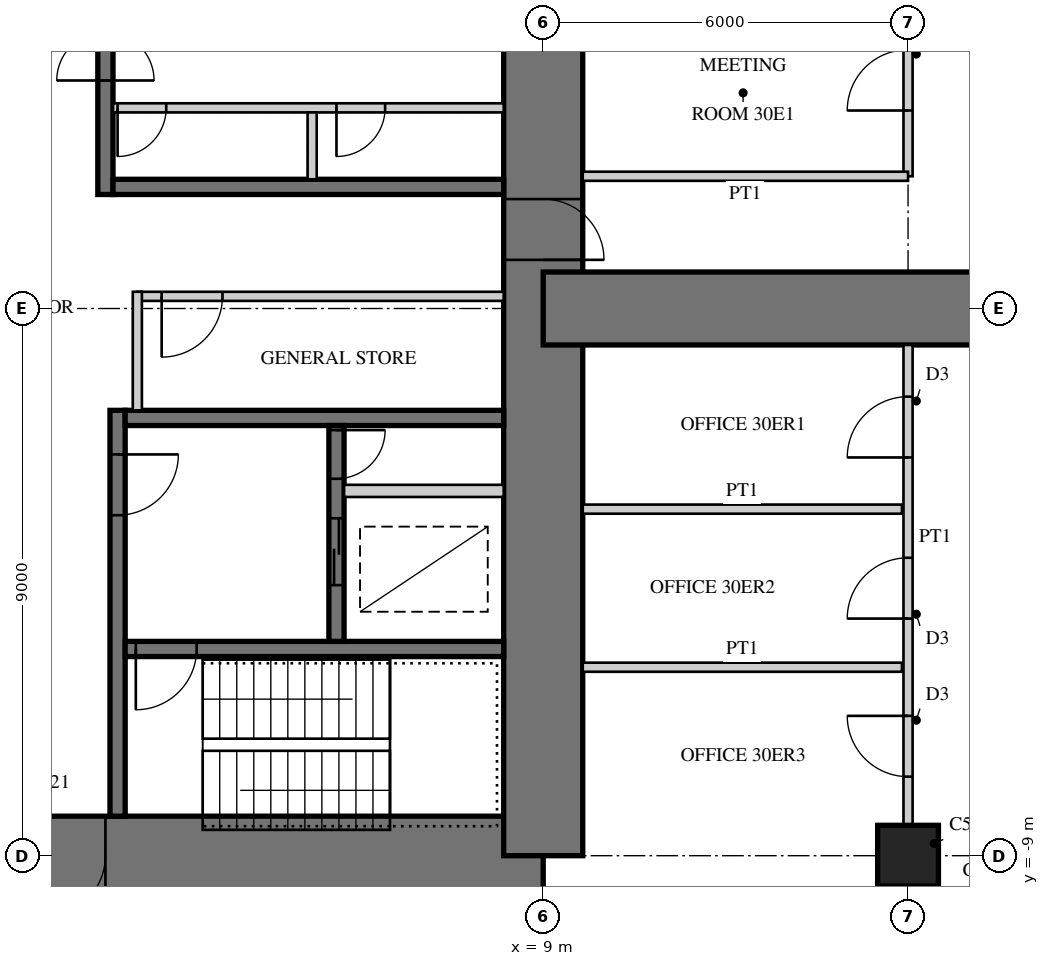
"""IFC4 building model, lengths in metres.
Left out: names, types, materials, properties, quantities, classifications, styles, units other than length and angle.
Written with IfcOpenShell. Run it as: python <this file> out.ifc"""

import sys

from ifc_helpers import new_model, si_unit, direction, frame, frame_2d, origin, origin_2d, place, context, subcontext, project, spatial, rectangle, extrude, element, fill, save


model = new_model("IFC4")
c1 = context("Model", 3, precision=1e-05, world=origin(), true_north=direction((0.0, 1.0)))
c2 = subcontext(c1, "Body", "Model", "MODEL_VIEW")
j1 = project(units=[si_unit("LENGTHUNIT", "METRE"), si_unit("PLANEANGLEUNIT", "RADIAN")], contexts=[c1])
p1 = place(None, origin())
s1 = spatial("IfcSite", under=j1, at=p1, CompositionType="ELEMENT")
p2 = place(p1, origin())
s2 = spatial("IfcBuilding", under=s1, at=p2, CompositionType="ELEMENT")
p3 = place(p2, frame((0.0, 0.0, 124.5)))
s3 = spatial("IfcBuildingStorey", under=s2, at=p3, CompositionType="ELEMENT", Elevation=124.5)
p4 = place(p3, frame((-9.0, -9.0, 0.0), z_axis=(0.0, 0.0, 1.0), x_axis=(1.0, 0.0, 0.0)))
e1 = element("IfcWall", 1, at=p4, inside=s3, PredefinedType="SHEAR", context=c2, shape_type="SweptSolid", body=[
    extrude(rectangle(XDim=18.0, YDim=1.3, at=frame_2d((9.0, 0.0))), origin(), (0.0, 0.0, 1.0), 4.0),
])
p5 = place(p4, frame((9.8, 0.0, 0.0)))
e2 = element("IfcOpeningElement", 2, at=p5, cuts=e1, PredefinedType="OPENING", context=c2, shape_type="SweptSolid", body=[
    extrude(rectangle(XDim=1.0, YDim=2.4, at=frame_2d((0.5, 1.2))), frame((0.0, 0.66, 0.0), z_axis=(0.0, -1.0, 0.0), x_axis=(1.0, 0.0, 0.0)), (0.0, 0.0, 1.0), 1.32),
])
p6 = place(p3, frame((9.0, -9.0, 0.0), z_axis=(0.0, 0.0, 1.0), x_axis=(0.0, 1.0, 0.0)))
e3 = element("IfcWall", 3, at=p6, inside=s3, PredefinedType="SHEAR", context=c2, shape_type="SweptSolid", body=[
    extrude(rectangle(XDim=18.0, YDim=1.3, at=frame_2d((9.0, 0.0))), origin(), (0.0, 0.0, 1.0), 4.0),
])
p7 = place(p6, frame((9.8, 0.0, 0.0)))
e4 = element("IfcOpeningElement", 4, at=p7, cuts=e3, PredefinedType="OPENING", context=c2, shape_type="SweptSolid", body=[
    extrude(rectangle(XDim=1.0, YDim=2.4, at=frame_2d((0.5, 1.2))), frame((0.0, 0.66, 0.0), z_axis=(0.0, -1.0, 0.0), x_axis=(1.0, 0.0, 0.0)), (0.0, 0.0, 1.0), 1.32),
])
p8 = place(p3, frame((1.8, 1.875, 0.0), z_axis=(0.0, 0.0, 1.0), x_axis=(0.0, 1.0, 0.0)))
e5 = element("IfcWall", 5, at=p8, inside=s3, PredefinedType="SHEAR", context=c2, shape_type="SweptSolid", body=[
    extrude(rectangle(XDim=6.475, YDim=0.25, at=frame_2d((3.238, 0.0))), origin(), (0.0, 0.0, 1.0), 4.0),
])
p9 = place(p8, frame((1.875, 0.0, 0.0)))
e6 = element("IfcOpeningElement", 6, at=p9, cuts=e5, PredefinedType="OPENING", context=c2, shape_type="SweptSolid", body=[
    extrude(rectangle(XDim=1.6, YDim=2.4, at=frame_2d((0.8, 1.2))), frame((0.0, 0.135, 0.0), z_axis=(0.0, -1.0, 0.0), x_axis=(1.0, 0.0, 0.0)), (0.0, 0.0, 1.0), 0.27),
])
p10 = place(p3, frame((1.925, 2.0, 0.0), z_axis=(0.0, 0.0, 1.0), x_axis=(1.0, 0.0, 0.0)))
e7 = element("IfcWall", 7, at=p10, inside=s3, PredefinedType="SHEAR", context=c2, shape_type="SweptSolid", body=[
    extrude(rectangle(XDim=6.425, YDim=0.25, at=frame_2d((3.212, 0.0))), origin(), (0.0, 0.0, 1.0), 4.0),
])
p11 = place(p3, frame((1.925, 3.3, 0.0), z_axis=(0.0, 0.0, 1.0), x_axis=(1.0, 0.0, 0.0)))
e8 = element("IfcWall", 8, at=p11, inside=s3, PredefinedType="PARTITIONING", context=c2, shape_type="SweptSolid", body=[
    extrude(rectangle(XDim=6.425, YDim=0.15, at=frame_2d((3.212, 0.0))), origin(), (0.0, 0.0, 1.0), 4.0),
])
p12 = place(p11, frame((0.075, 0.0, 0.0)))
e9 = element("IfcOpeningElement", 9, at=p12, cuts=e8, PredefinedType="OPENING", context=c2, shape_type="SweptSolid", body=[
    extrude(rectangle(XDim=0.8, YDim=2.1, at=frame_2d((0.4, 1.05))), frame((0.0, 0.085, 0.0), z_axis=(0.0, -1.0, 0.0), x_axis=(1.0, 0.0, 0.0)), (0.0, 0.0, 1.0), 0.17),
])
p13 = place(p11, frame((3.675, 0.0, 0.0)))
e10 = element("IfcOpeningElement", 10, at=p13, cuts=e8, PredefinedType="OPENING", context=c2, shape_type="SweptSolid", body=[
    extrude(rectangle(XDim=0.8, YDim=2.1, at=frame_2d((0.4, 1.05))), frame((0.0, 0.085, 0.0), z_axis=(0.0, -1.0, 0.0), x_axis=(1.0, 0.0, 0.0)), (0.0, 0.0, 1.0), 0.17),
])
p14 = place(p3, frame((5.2, 2.125, 0.0), z_axis=(0.0, 0.0, 1.0), x_axis=(0.0, 1.0, 0.0)))
e11 = element("IfcWall", 11, at=p14, inside=s3, PredefinedType="PARTITIONING", context=c2, shape_type="SweptSolid", body=[
    extrude(rectangle(XDim=1.1, YDim=0.15, at=frame_2d((0.55, 0.0))), origin(), (0.0, 0.0, 1.0), 4.0),
])
p15 = place(p3, frame((2.0, -1.675, 0.0), z_axis=(0.0, 0.0, 1.0), x_axis=(0.0, -1.0, 0.0)))
e12 = element("IfcWall", 12, at=p15, inside=s3, PredefinedType="SHEAR", context=c2, shape_type="SweptSolid", body=[
    extrude(rectangle(XDim=6.675, YDim=0.25, at=frame_2d((3.337, 0.0))), origin(), (0.0, 0.0, 1.0), 4.0),
])
p16 = place(p15, frame((0.725, 0.0, 0.0)))
e13 = element("IfcOpeningElement", 13, at=p16, cuts=e12, PredefinedType="OPENING", context=c2, shape_type="SweptSolid", body=[
    extrude(rectangle(XDim=1.0, YDim=2.1, at=frame_2d((0.5, 1.05))), frame((0.0, 0.135, 0.0), z_axis=(0.0, -1.0, 0.0), x_axis=(1.0, 0.0, 0.0)), (0.0, 0.0, 1.0), 0.27),
])
p17 = place(p3, frame((2.125, -1.8, 0.0), z_axis=(0.0, 0.0, 1.0), x_axis=(1.0, 0.0, 0.0)))
e14 = element("IfcWall", 14, at=p17, inside=s3, PredefinedType="SHEAR", context=c2, shape_type="SweptSolid", body=[
    extrude(rectangle(XDim=6.225, YDim=0.25, at=frame_2d((3.113, 0.0))), origin(), (0.0, 0.0, 1.0), 4.0),
])
p18 = place(p3, frame((2.125, -5.6, 0.0), z_axis=(0.0, 0.0, 1.0), x_axis=(1.0, 0.0, 0.0)))
e15 = element("IfcWall", 15, at=p18, inside=s3, PredefinedType="SHEAR", context=c2, shape_type="SweptSolid", body=[
    extrude(rectangle(XDim=6.225, YDim=0.25, at=frame_2d((3.113, 0.0))), origin(), (0.0, 0.0, 1.0), 4.0),
])
p19 = place(p18, frame((0.175, 0.0, 0.0)))
e16 = element("IfcOpeningElement", 16, at=p19, cuts=e15, PredefinedType="OPENING", context=c2, shape_type="SweptSolid", body=[
    extrude(rectangle(XDim=1.0, YDim=2.1, at=frame_2d((0.5, 1.05))), frame((0.0, 0.135, 0.0), z_axis=(0.0, -1.0, 0.0), x_axis=(1.0, 0.0, 0.0)), (0.0, 0.0, 1.0), 0.27),
])
p20 = place(p3, frame((5.6, -1.925, 0.0), z_axis=(0.0, 0.0, 1.0), x_axis=(0.0, -1.0, 0.0)))
e17 = element("IfcWall", 17, at=p20, inside=s3, PredefinedType="SHEAR", context=c2, shape_type="SweptSolid", body=[
    extrude(rectangle(XDim=3.55, YDim=0.25, at=frame_2d((1.775, 0.0))), origin(), (0.0, 0.0, 1.0), 4.0),
])
p21 = place(p20, frame((1.525, 0.0, 0.0)))
e18 = element("IfcOpeningElement", 18, at=p21, cuts=e17, PredefinedType="OPENING", context=c2, shape_type="SweptSolid", body=[
    extrude(rectangle(XDim=1.1, YDim=2.2, at=frame_2d((0.55, 1.1))), frame((0.0, 0.135, 0.0), z_axis=(0.0, -1.0, 0.0), x_axis=(1.0, 0.0, 0.0)), (0.0, 0.0, 1.0), 0.27),
])
p22 = place(p20, frame((0.075, 0.0, 0.0)))
e19 = element("IfcOpeningElement", 19, at=p22, cuts=e17, PredefinedType="OPENING", context=c2, shape_type="SweptSolid", body=[
    extrude(rectangle(XDim=0.8, YDim=2.1, at=frame_2d((0.4, 1.05))), frame((0.0, 0.135, 0.0), z_axis=(0.0, -1.0, 0.0), x_axis=(1.0, 0.0, 0.0)), (0.0, 0.0, 1.0), 0.27),
])
p23 = place(p3, frame((5.725, -3.0, 0.0), z_axis=(0.0, 0.0, 1.0), x_axis=(1.0, 0.0, 0.0)))
e20 = element("IfcWall", 20, at=p23, inside=s3, PredefinedType="PARTITIONING", context=c2, shape_type="SweptSolid", body=[
    extrude(rectangle(XDim=2.625, YDim=0.2, at=frame_2d((1.312, 0.0))), origin(), (0.0, 0.0, 1.0), 4.0),
])
p24 = place(p3, frame((9.0, 0.0, 0.0), z_axis=(0.0, 0.0, 1.0), x_axis=(1.0, 0.0, 0.0)))
e21 = element("IfcWall", 21, at=p24, inside=s3, PredefinedType="SHEAR", context=c2, shape_type="SweptSolid", body=[
    extrude(rectangle(XDim=18.0, YDim=1.2, at=frame_2d((9.0, 0.0))), origin(), (0.0, 0.0, 1.0), 4.0),
])
p25 = place(p24, frame((9.8, 0.0, 0.0)))
e22 = element("IfcOpeningElement", 22, at=p25, cuts=e21, PredefinedType="OPENING", context=c2, shape_type="SweptSolid", body=[
    extrude(rectangle(XDim=1.0, YDim=2.2, at=frame_2d((0.5, 1.1))), frame((0.0, 0.61, 0.0), z_axis=(0.0, -1.0, 0.0), x_axis=(1.0, 0.0, 0.0)), (0.0, 0.0, 1.0), 1.22),
])
p26 = place(p3, frame((15.0, -9.0, 0.0), z_axis=(0.0, 0.0, 1.0), x_axis=(1.0, 0.0, 0.0)))
e23 = element("IfcColumn", 23, at=p26, inside=s3, PredefinedType="COLUMN", context=c2, shape_type="SweptSolid", body=[
    extrude(rectangle(XDim=1.0, YDim=1.0, at=origin_2d()), origin(), (0.0, 0.0, 1.0), 4.0),
])
p27 = place(p3, frame((2.325, 0.2, 0.0), z_axis=(0.0, 0.0, 1.0), x_axis=(1.0, 0.0, 0.0)))
e24 = element("IfcWall", 24, at=p27, inside=s3, PredefinedType="PARTITIONING", context=c2, shape_type="SweptSolid", body=[
    extrude(rectangle(XDim=6.025, YDim=0.15, at=frame_2d((3.013, 0.0))), origin(), (0.0, 0.0, 1.0), 3.8),
])
p28 = place(p27, frame((0.4, 0.0, 0.0)))
e25 = element("IfcOpeningElement", 25, at=p28, cuts=e24, PredefinedType="OPENING", context=c2, shape_type="SweptSolid", body=[
    extrude(rectangle(XDim=1.0, YDim=2.1, at=frame_2d((0.5, 1.05))), frame((0.0, 0.085, 0.0), z_axis=(0.0, -1.0, 0.0), x_axis=(1.0, 0.0, 0.0)), (0.0, 0.0, 1.0), 0.17),
])
p29 = place(p3, frame((2.325, -1.675, 0.0), z_axis=(0.0, 0.0, 1.0), x_axis=(0.0, 1.0, 0.0)))
e26 = element("IfcWall", 26, at=p29, inside=s3, PredefinedType="PARTITIONING", context=c2, shape_type="SweptSolid", body=[
    extrude(rectangle(XDim=1.95, YDim=0.15, at=frame_2d((0.975, 0.0))), origin(), (0.0, 0.0, 1.0), 3.8),
])
p30 = place(p3, frame((15.0, 2.175, 0.0), z_axis=(0.0, 0.0, 1.0), x_axis=(0.0, 1.0, 0.0)))
e27 = element("IfcWall", 27, at=p30, inside=s3, PredefinedType="PARTITIONING", context=c2, shape_type="SweptSolid", body=[
    extrude(rectangle(XDim=6.325, YDim=0.15, at=frame_2d((3.163, 0.0))), origin(), (0.0, 0.0, 1.0), 3.0),
])
p31 = place(p30, frame((1.081, 0.0, 0.0)))
e28 = element("IfcOpeningElement", 28, at=p31, cuts=e27, PredefinedType="OPENING", context=c2, shape_type="SweptSolid", body=[
    extrude(rectangle(XDim=1.0, YDim=2.1, at=frame_2d((0.5, 1.05))), frame((0.0, 0.085, 0.0), z_axis=(0.0, -1.0, 0.0), x_axis=(1.0, 0.0, 0.0)), (0.0, 0.0, 1.0), 0.17),
])
p32 = place(p30, frame((4.244, 0.0, 0.0)))
e29 = element("IfcOpeningElement", 29, at=p32, cuts=e27, PredefinedType="OPENING", context=c2, shape_type="SweptSolid", body=[
    extrude(rectangle(XDim=1.0, YDim=2.1, at=frame_2d((0.5, 1.05))), frame((0.0, 0.085, 0.0), z_axis=(0.0, -1.0, 0.0), x_axis=(1.0, 0.0, 0.0)), (0.0, 0.0, 1.0), 0.17),
])
p33 = place(p3, frame((9.65, 2.175, 0.0), z_axis=(0.0, 0.0, 1.0), x_axis=(1.0, 0.0, 0.0)))
e30 = element("IfcWall", 30, at=p33, inside=s3, PredefinedType="PARTITIONING", context=c2, shape_type="SweptSolid", body=[
    extrude(rectangle(XDim=5.35, YDim=0.15, at=frame_2d((2.675, 0.0))), origin(), (0.0, 0.0, 1.0), 3.8),
])
p34 = place(p3, frame((15.0, -8.5, 0.0), z_axis=(0.0, 0.0, 1.0), x_axis=(0.0, 1.0, 0.0)))
e31 = element("IfcWall", 31, at=p34, inside=s3, PredefinedType="PARTITIONING", context=c2, shape_type="SweptSolid", body=[
    extrude(rectangle(XDim=7.9, YDim=0.15, at=frame_2d((3.95, 0.0))), origin(), (0.0, 0.0, 1.0), 3.0),
])
p35 = place(p34, frame((0.8, 0.0, 0.0)))
e32 = element("IfcOpeningElement", 32, at=p35, cuts=e31, PredefinedType="OPENING", context=c2, shape_type="SweptSolid", body=[
    extrude(rectangle(XDim=1.0, YDim=2.1, at=frame_2d((0.5, 1.05))), frame((0.0, 0.085, 0.0), z_axis=(0.0, -1.0, 0.0), x_axis=(1.0, 0.0, 0.0)), (0.0, 0.0, 1.0), 0.17),
])
p36 = place(p34, frame((3.4, 0.0, 0.0)))
e33 = element("IfcOpeningElement", 33, at=p36, cuts=e31, PredefinedType="OPENING", context=c2, shape_type="SweptSolid", body=[
    extrude(rectangle(XDim=1.0, YDim=2.1, at=frame_2d((0.5, 1.05))), frame((0.0, 0.085, 0.0), z_axis=(0.0, -1.0, 0.0), x_axis=(1.0, 0.0, 0.0)), (0.0, 0.0, 1.0), 0.17),
])
p37 = place(p34, frame((6.05, 0.0, 0.0)))
e34 = element("IfcOpeningElement", 34, at=p37, cuts=e31, PredefinedType="OPENING", context=c2, shape_type="SweptSolid", body=[
    extrude(rectangle(XDim=1.0, YDim=2.1, at=frame_2d((0.5, 1.05))), frame((0.0, 0.085, 0.0), z_axis=(0.0, -1.0, 0.0), x_axis=(1.0, 0.0, 0.0)), (0.0, 0.0, 1.0), 0.17),
])
p38 = place(p3, frame((9.65, -3.3, 0.0), z_axis=(0.0, 0.0, 1.0), x_axis=(1.0, 0.0, 0.0)))
e35 = element("IfcWall", 35, at=p38, inside=s3, PredefinedType="PARTITIONING", context=c2, shape_type="SweptSolid", body=[
    extrude(rectangle(XDim=5.25, YDim=0.15, at=frame_2d((2.625, 0.0))), origin(), (0.0, 0.0, 1.0), 3.8),
])
p39 = place(p3, frame((9.65, -5.9, 0.0), z_axis=(0.0, 0.0, 1.0), x_axis=(1.0, 0.0, 0.0)))
e36 = element("IfcWall", 36, at=p39, inside=s3, PredefinedType="PARTITIONING", context=c2, shape_type="SweptSolid", body=[
    extrude(rectangle(XDim=5.25, YDim=0.15, at=frame_2d((2.625, 0.0))), origin(), (0.0, 0.0, 1.0), 3.1),
])
p40 = place(p28, frame((1.0, 0.0, 0.0), z_axis=(0.0, 0.0, 1.0), x_axis=(-1.0, 0.0, 0.0)))
e37 = element("IfcDoor", 37, at=p40, inside=s3, OperationType="SINGLE_SWING_RIGHT", PredefinedType="DOOR", context=c2, shape_type="SweptSolid", body=[
    extrude(rectangle(XDim=1.0, YDim=2.1, at=frame_2d((0.5, 1.05))), frame((0.0, 0.025, 0.0), z_axis=(0.0, -1.0, 0.0), x_axis=(1.0, 0.0, 0.0)), (0.0, 0.0, 1.0), 0.05),
])
fill(e25, e37)
p41 = place(p31, origin())
e38 = element("IfcDoor", 38, at=p41, inside=s3, OperationType="SINGLE_SWING_LEFT", PredefinedType="DOOR", context=c2, shape_type="SweptSolid", body=[
    extrude(rectangle(XDim=1.0, YDim=2.1, at=frame_2d((0.5, 1.05))), frame((0.0, 0.025, 0.0), z_axis=(0.0, -1.0, 0.0), x_axis=(1.0, 0.0, 0.0)), (0.0, 0.0, 1.0), 0.05),
])
fill(e28, e38)
p42 = place(p35, origin())
e39 = element("IfcDoor", 39, at=p42, inside=s3, OperationType="SINGLE_SWING_RIGHT", PredefinedType="DOOR", context=c2, shape_type="SweptSolid", body=[
    extrude(rectangle(XDim=1.0, YDim=2.1, at=frame_2d((0.5, 1.05))), frame((0.0, 0.025, 0.0), z_axis=(0.0, -1.0, 0.0), x_axis=(1.0, 0.0, 0.0)), (0.0, 0.0, 1.0), 0.05),
])
fill(e32, e39)
p43 = place(p36, origin())
e40 = element("IfcDoor", 40, at=p43, inside=s3, OperationType="SINGLE_SWING_LEFT", PredefinedType="DOOR", context=c2, shape_type="SweptSolid", body=[
    extrude(rectangle(XDim=1.0, YDim=2.1, at=frame_2d((0.5, 1.05))), frame((0.0, 0.025, 0.0), z_axis=(0.0, -1.0, 0.0), x_axis=(1.0, 0.0, 0.0)), (0.0, 0.0, 1.0), 0.05),
])
fill(e33, e40)
p44 = place(p37, origin())
e41 = element("IfcDoor", 41, at=p44, inside=s3, OperationType="SINGLE_SWING_LEFT", PredefinedType="DOOR", context=c2, shape_type="SweptSolid", body=[
    extrude(rectangle(XDim=1.0, YDim=2.1, at=frame_2d((0.5, 1.05))), frame((0.0, 0.025, 0.0), z_axis=(0.0, -1.0, 0.0), x_axis=(1.0, 0.0, 0.0)), (0.0, 0.0, 1.0), 0.05),
])
fill(e34, e41)
p45 = place(p5, frame((1.0, 0.0, 0.0), z_axis=(0.0, 0.0, 1.0), x_axis=(-1.0, 0.0, 0.0)))
e42 = element("IfcDoor", 42, at=p45, inside=s3, OperationType="SINGLE_SWING_RIGHT", PredefinedType="DOOR", context=c2, shape_type="SweptSolid", body=[
    extrude(rectangle(XDim=1.0, YDim=2.4, at=frame_2d((0.5, 1.2))), frame((0.0, -0.005, 0.0), z_axis=(0.0, -1.0, 0.0), x_axis=(1.0, 0.0, 0.0)), (0.0, 0.0, 1.0), 0.05),
])
fill(e2, e42)
p46 = place(p7, frame((1.0, 0.0, 0.0), z_axis=(0.0, 0.0, 1.0), x_axis=(-1.0, 0.0, 0.0)))
e43 = element("IfcDoor", 43, at=p46, inside=s3, OperationType="SINGLE_SWING_RIGHT", PredefinedType="DOOR", context=c2, shape_type="SweptSolid", body=[
    extrude(rectangle(XDim=1.0, YDim=2.4, at=frame_2d((0.5, 1.2))), frame((0.0, -0.005, 0.0), z_axis=(0.0, -1.0, 0.0), x_axis=(1.0, 0.0, 0.0)), (0.0, 0.0, 1.0), 0.05),
])
fill(e4, e43)
p47 = place(p9, origin())
e44 = element("IfcDoor", 44, at=p47, inside=s3, OperationType="DOUBLE_DOOR_DOUBLE_SWING", PredefinedType="DOOR", context=c2, shape_type="SweptSolid", body=[
    extrude(rectangle(XDim=1.6, YDim=2.4, at=frame_2d((0.8, 1.2))), frame((0.0, 0.025, 0.0), z_axis=(0.0, -1.0, 0.0), x_axis=(1.0, 0.0, 0.0)), (0.0, 0.0, 1.0), 0.05),
])
fill(e6, e44)
p48 = place(p12, frame((0.8, 0.0, 0.0), z_axis=(0.0, 0.0, 1.0), x_axis=(-1.0, 0.0, 0.0)))
e45 = element("IfcDoor", 45, at=p48, inside=s3, OperationType="SINGLE_SWING_RIGHT", PredefinedType="DOOR", context=c2, shape_type="SweptSolid", body=[
    extrude(rectangle(XDim=0.8, YDim=2.1, at=frame_2d((0.4, 1.05))), frame((0.0, 0.025, 0.0), z_axis=(0.0, -1.0, 0.0), x_axis=(1.0, 0.0, 0.0)), (0.0, 0.0, 1.0), 0.05),
])
fill(e9, e45)
p49 = place(p13, frame((0.8, 0.0, 0.0), z_axis=(0.0, 0.0, 1.0), x_axis=(-1.0, 0.0, 0.0)))
e46 = element("IfcDoor", 46, at=p49, inside=s3, OperationType="SINGLE_SWING_RIGHT", PredefinedType="DOOR", context=c2, shape_type="SweptSolid", body=[
    extrude(rectangle(XDim=0.8, YDim=2.1, at=frame_2d((0.4, 1.05))), frame((0.0, 0.025, 0.0), z_axis=(0.0, -1.0, 0.0), x_axis=(1.0, 0.0, 0.0)), (0.0, 0.0, 1.0), 0.05),
])
fill(e10, e46)
p50 = place(p16, origin())
e47 = element("IfcDoor", 47, at=p50, inside=s3, OperationType="SINGLE_SWING_LEFT", PredefinedType="DOOR", context=c2, shape_type="SweptSolid", body=[
    extrude(rectangle(XDim=1.0, YDim=2.1, at=frame_2d((0.5, 1.05))), frame((0.0, 0.025, 0.0), z_axis=(0.0, -1.0, 0.0), x_axis=(1.0, 0.0, 0.0)), (0.0, 0.0, 1.0), 0.05),
])
fill(e13, e47)
p51 = place(p19, frame((1.0, 0.0, 0.0), z_axis=(0.0, 0.0, 1.0), x_axis=(-1.0, 0.0, 0.0)))
e48 = element("IfcDoor", 48, at=p51, inside=s3, OperationType="SINGLE_SWING_RIGHT", PredefinedType="DOOR", context=c2, shape_type="SweptSolid", body=[
    extrude(rectangle(XDim=1.0, YDim=2.1, at=frame_2d((0.5, 1.05))), frame((0.0, 0.025, 0.0), z_axis=(0.0, -1.0, 0.0), x_axis=(1.0, 0.0, 0.0)), (0.0, 0.0, 1.0), 0.05),
])
fill(e16, e48)
p52 = place(p21, origin())
e49 = element("IfcDoor", 49, at=p52, inside=s3, OperationType="DOUBLE_DOOR_SLIDING", PredefinedType="DOOR", context=c2, shape_type="SweptSolid", body=[
    extrude(rectangle(XDim=1.1, YDim=2.2, at=frame_2d((0.55, 1.1))), frame((0.0, 0.025, 0.0), z_axis=(0.0, -1.0, 0.0), x_axis=(1.0, 0.0, 0.0)), (0.0, 0.0, 1.0), 0.05),
])
fill(e18, e49)
p53 = place(p22, origin())
e50 = element("IfcDoor", 50, at=p53, inside=s3, OperationType="SINGLE_SWING_LEFT", PredefinedType="DOOR", context=c2, shape_type="SweptSolid", body=[
    extrude(rectangle(XDim=0.8, YDim=2.1, at=frame_2d((0.4, 1.05))), frame((0.0, 0.025, 0.0), z_axis=(0.0, -1.0, 0.0), x_axis=(1.0, 0.0, 0.0)), (0.0, 0.0, 1.0), 0.05),
])
fill(e19, e50)
save(model, sys.argv[1])
